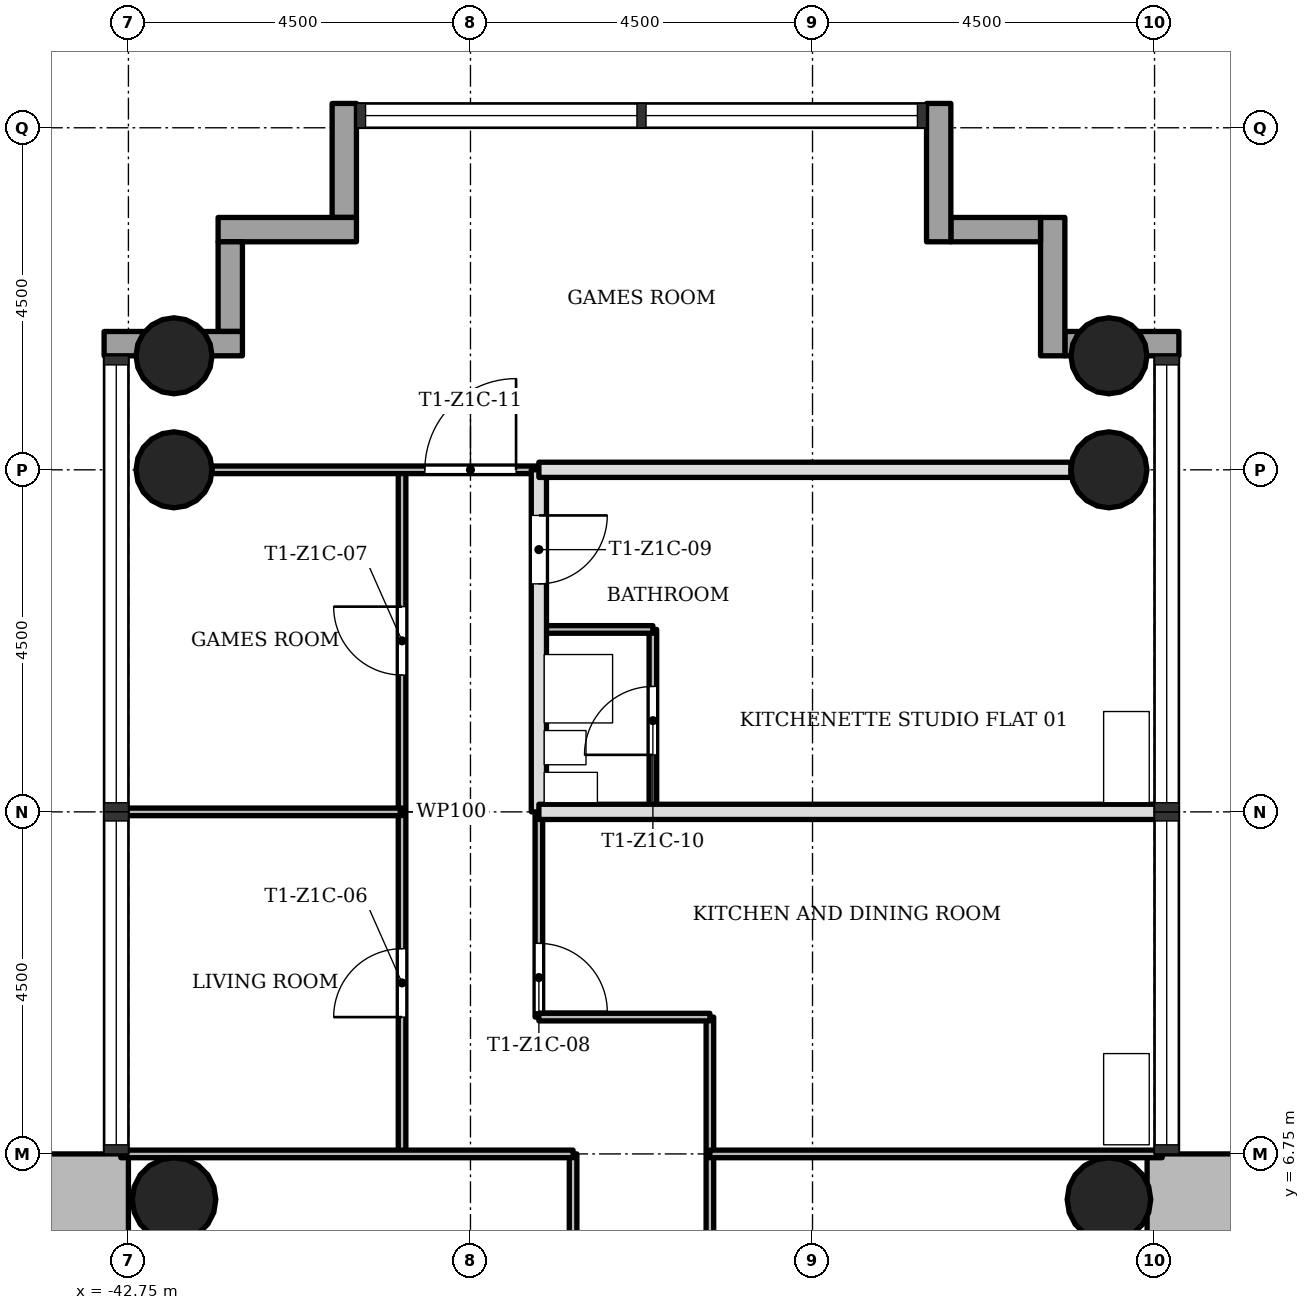
"""IFC4 building model, lengths in metres.
Left out: names, types, materials, properties, quantities, classifications, styles, units other than length and angle.
Written with IfcOpenShell. Run it as: python <this file> out.ifc"""

import sys

from ifc_helpers import new_model, si_unit, direction, frame, frame_2d, origin, origin_2d, place, context, subcontext, project, spatial, rectangle, hollow_circle, extrude, element, fill, save


model = new_model("IFC4")
c1 = context("Model", 3, precision=1e-05, world=origin(), true_north=direction((0.0, 1.0)))
c2 = subcontext(c1, "Body", "Model", "MODEL_VIEW")
j1 = project(units=[si_unit("LENGTHUNIT", "METRE"), si_unit("PLANEANGLEUNIT", "RADIAN")], contexts=[c1])
p1 = place(None, origin())
s1 = spatial("IfcSite", under=j1, at=p1, CompositionType="ELEMENT")
p2 = place(p1, origin())
s2 = spatial("IfcBuilding", under=s1, at=p2, CompositionType="ELEMENT")
p3 = place(p2, frame((0.0, 0.0, 48.3)))
s3 = spatial("IfcBuildingStorey", under=s2, at=p3, CompositionType="ELEMENT", Elevation=48.3)
p4 = place(p3, frame((-21.35, 6.2, 0.0), z_axis=(0.0, 0.0, 1.0), x_axis=(-1.0, 0.0, 0.0)))
e1 = element("IfcWall", 1, at=p4, inside=s3, PredefinedType="SHEAR", context=c2, shape_type="SweptSolid", body=[
    extrude(rectangle(XDim=7.998, YDim=1.1, at=frame_2d((3.999, 0.0))), origin(), (0.0, 0.0, 1.0), 3.4),
])
p5 = place(p3, frame((-43.3, -5.65, 0.0), z_axis=(0.0, 0.0, 1.0), x_axis=(0.0, 1.0, 0.0)))
e2 = element("IfcWall", 2, at=p5, inside=s3, PredefinedType="SHEAR", context=c2, shape_type="SweptSolid", body=[
    extrude(rectangle(XDim=12.4, YDim=1.1, at=frame_2d((6.2, 0.0))), origin(), (0.0, 0.0, 1.0), 3.4),
])
p6 = place(p5, frame((4.75, 0.0, 0.0)))
e3 = element("IfcOpeningElement", 3, at=p6, cuts=e2, PredefinedType="OPENING", context=c2, shape_type="SweptSolid", body=[
    extrude(rectangle(XDim=1.8, YDim=2.1, at=frame_2d((0.9, 1.05))), frame((0.0, 0.56, 0.0), z_axis=(0.0, -1.0, 0.0), x_axis=(1.0, 0.0, 0.0)), (0.0, 0.0, 1.0), 1.12),
])
for number, where, z_axis, x_axis in (
    (4, (-29.85, 15.75, 0.0), (0.0, 0.0, 1.0), (1.0, 0.0, 0.0)),
    (5, (-42.15, 15.75, 0.0), (0.0, 0.0, 1.0), (1.0, 0.0, 0.0)),
    (6, (-29.85, 17.25, 0.0), (0.0, 0.0, 1.0), (1.0, 0.0, 0.0)),
    (7, (-42.15, 17.25, 0.0), (0.0, 0.0, 1.0), (1.0, 0.0, 0.0)),
):
    element("IfcColumn", number, at=place(p3, frame(where, z_axis=z_axis, x_axis=x_axis)), inside=s3, PredefinedType="COLUMN", context=c2, shape_type="SweptSolid", body=[
        extrude(hollow_circle(Radius=0.5, WallThickness=0.036, at=origin_2d()), origin(), (0.0, 0.0, 1.0), 3.4),
    ])
for number, where, z_axis, x_axis in (
    (8, (-29.85, 6.15, 0.0), (0.0, 0.0, 1.0), (1.0, 0.0, 0.0)),
    (9, (-42.15, 6.15, 0.0), (0.0, 0.0, 1.0), (1.0, 0.0, 0.0)),
):
    element("IfcColumn", number, at=place(p3, frame(where, z_axis=z_axis, x_axis=x_axis)), inside=s3, PredefinedType="COLUMN", context=c2, shape_type="SweptSolid", body=[
        extrude(hollow_circle(Radius=0.55, WallThickness=0.04, at=origin_2d()), origin(), (0.0, 0.0, 1.0), 3.4),
    ])
p7 = place(p3, frame((-28.93, 17.41, -0.3), z_axis=(0.0, 0.0, 1.0), x_axis=(-1.0, 0.0, 0.0)))
e10 = element("IfcWall", 10, at=p7, inside=s3, PredefinedType="STANDARD", context=c2, shape_type="SweptSolid", body=[
    extrude(rectangle(XDim=1.5, YDim=0.32, at=frame_2d((0.75, 0.0))), origin(), (0.0, 0.0, 1.0), 3.4),
])
p8 = place(p3, frame((-30.59, 17.25, -0.3), z_axis=(0.0, 0.0, 1.0), x_axis=(0.0, 1.0, 0.0)))
e11 = element("IfcWall", 11, at=p8, inside=s3, PredefinedType="STANDARD", context=c2, shape_type="SweptSolid", body=[
    extrude(rectangle(XDim=1.82, YDim=0.32, at=frame_2d((0.91, 0.0))), origin(), (0.0, 0.0, 1.0), 3.4),
])
p9 = place(p3, frame((-30.75, 18.91, -0.3), z_axis=(0.0, 0.0, 1.0), x_axis=(-1.0, 0.0, 0.0)))
e12 = element("IfcWall", 12, at=p9, inside=s3, PredefinedType="STANDARD", context=c2, shape_type="SweptSolid", body=[
    extrude(rectangle(XDim=1.18, YDim=0.32, at=frame_2d((0.59, 0.0))), origin(), (0.0, 0.0, 1.0), 3.4),
])
p10 = place(p3, frame((-32.09, 18.75, -0.3), z_axis=(0.0, 0.0, 1.0), x_axis=(0.0, 1.0, 0.0)))
e13 = element("IfcWall", 13, at=p10, inside=s3, PredefinedType="STANDARD", context=c2, shape_type="SweptSolid", body=[
    extrude(rectangle(XDim=1.82, YDim=0.32, at=frame_2d((0.91, 0.0))), origin(), (0.0, 0.0, 1.0), 3.4),
])
p11 = place(p3, frame((-39.91, 20.57, -0.3), z_axis=(0.0, 0.0, 1.0), x_axis=(0.0, -1.0, 0.0)))
e14 = element("IfcWall", 14, at=p11, inside=s3, PredefinedType="STANDARD", context=c2, shape_type="SweptSolid", body=[
    extrude(rectangle(XDim=1.5, YDim=0.32, at=frame_2d((0.75, 0.0))), origin(), (0.0, 0.0, 1.0), 3.4),
])
p12 = place(p3, frame((-39.75, 18.91, -0.3), z_axis=(0.0, 0.0, 1.0), x_axis=(-1.0, 0.0, 0.0)))
e15 = element("IfcWall", 15, at=p12, inside=s3, PredefinedType="STANDARD", context=c2, shape_type="SweptSolid", body=[
    extrude(rectangle(XDim=1.82, YDim=0.32, at=frame_2d((0.91, 0.0))), origin(), (0.0, 0.0, 1.0), 3.4),
])
p13 = place(p3, frame((-41.41, 18.75, -0.3), z_axis=(0.0, 0.0, 1.0), x_axis=(0.0, -1.0, 0.0)))
e16 = element("IfcWall", 16, at=p13, inside=s3, PredefinedType="STANDARD", context=c2, shape_type="SweptSolid", body=[
    extrude(rectangle(XDim=1.18, YDim=0.32, at=frame_2d((0.59, 0.0))), origin(), (0.0, 0.0, 1.0), 3.4),
])
p14 = place(p3, frame((-41.25, 17.41, -0.3), z_axis=(0.0, 0.0, 1.0), x_axis=(-1.0, 0.0, 0.0)))
e17 = element("IfcWall", 17, at=p14, inside=s3, PredefinedType="STANDARD", context=c2, shape_type="SweptSolid", body=[
    extrude(rectangle(XDim=1.82, YDim=0.32, at=frame_2d((0.91, 0.0))), origin(), (0.0, 0.0, 1.0), 3.4),
])
p15 = place(p3, frame((-39.15, 6.75, 0.0), z_axis=(0.0, 0.0, 1.0), x_axis=(0.0, 1.0, 0.0)))
e18 = element("IfcWall", 18, at=p15, inside=s3, PredefinedType="PARTITIONING", context=c2, shape_type="SweptSolid", body=[
    extrude(rectangle(XDim=9.0, YDim=0.1, at=frame_2d((4.5, 0.0))), origin(), (0.0, 0.0, 1.0), 3.0),
])
p16 = place(p15, frame((1.8, 0.0, 0.0)))
e19 = element("IfcOpeningElement", 19, at=p16, cuts=e18, PredefinedType="OPENING", context=c2, shape_type="SweptSolid", body=[
    extrude(rectangle(XDim=0.9, YDim=2.1, at=frame_2d((0.45, 1.05))), frame((0.0, 0.06, 0.0), z_axis=(0.0, -1.0, 0.0), x_axis=(1.0, 0.0, 0.0)), (0.0, 0.0, 1.0), 0.12),
])
p17 = place(p15, frame((6.3, 0.0, 0.0)))
e20 = element("IfcOpeningElement", 20, at=p17, cuts=e18, PredefinedType="OPENING", context=c2, shape_type="SweptSolid", body=[
    extrude(rectangle(XDim=0.9, YDim=2.1, at=frame_2d((0.45, 1.05))), frame((0.0, 0.06, 0.0), z_axis=(0.0, -1.0, 0.0), x_axis=(1.0, 0.0, 0.0)), (0.0, 0.0, 1.0), 0.12),
])
p18 = place(p3, frame((-37.35, 8.55, 0.0), z_axis=(0.0, 0.0, 1.0), x_axis=(0.0, 1.0, 0.0)))
e21 = element("IfcWall", 21, at=p18, inside=s3, PredefinedType="PARTITIONING", context=c2, shape_type="SweptSolid", body=[
    extrude(rectangle(XDim=2.7, YDim=0.1, at=frame_2d((1.35, 0.0))), origin(), (0.0, 0.0, 1.0), 3.0),
])
p19 = place(p18, frame((0.07, 0.0, 0.0)))
e22 = element("IfcOpeningElement", 22, at=p19, cuts=e21, PredefinedType="OPENING", context=c2, shape_type="SweptSolid", body=[
    extrude(rectangle(XDim=0.9, YDim=2.1, at=frame_2d((0.45, 1.05))), frame((0.0, 0.06, 0.0), z_axis=(0.0, -1.0, 0.0), x_axis=(1.0, 0.0, 0.0)), (0.0, 0.0, 1.0), 0.12),
])
p20 = place(p3, frame((-37.35, 11.25, 0.0), z_axis=(0.0, 0.0, 1.0), x_axis=(0.0, 1.0, 0.0)))
e23 = element("IfcWall", 23, at=p20, inside=s3, PredefinedType="SOLIDWALL", context=c2, shape_type="SweptSolid", body=[
    extrude(rectangle(XDim=4.5, YDim=0.2, at=frame_2d((2.25, 0.0))), origin(), (0.0, 0.0, 1.0), 3.0),
])
p21 = place(p20, frame((3.0, 0.0, 0.0)))
e24 = element("IfcOpeningElement", 24, at=p21, cuts=e23, PredefinedType="OPENING", context=c2, shape_type="SweptSolid", body=[
    extrude(rectangle(XDim=0.9, YDim=2.1, at=frame_2d((0.45, 1.05))), frame((0.0, 0.11, 0.0), z_axis=(0.0, -1.0, 0.0), x_axis=(1.0, 0.0, 0.0)), (0.0, 0.0, 1.0), 0.22),
])
p22 = place(p3, frame((-36.9, 1.5, 0.0), z_axis=(0.0, 0.0, 1.0), x_axis=(0.0, 1.0, 0.0)))
e25 = element("IfcWall", 25, at=p22, inside=s3, PredefinedType="PARTITIONING", context=c2, shape_type="SweptSolid", body=[
    extrude(rectangle(XDim=5.25, YDim=0.1, at=frame_2d((2.625, 0.0))), origin(), (0.0, 0.0, 1.0), 3.0),
])
p23 = place(p3, frame((-35.85, 11.25, 0.0), z_axis=(0.0, 0.0, 1.0), x_axis=(0.0, 1.0, 0.0)))
e26 = element("IfcWall", 26, at=p23, inside=s3, PredefinedType="PARTITIONING", context=c2, shape_type="SweptSolid", body=[
    extrude(rectangle(XDim=2.4, YDim=0.1, at=frame_2d((1.2, 0.0))), origin(), (0.0, 0.0, 1.0), 3.0),
])
p24 = place(p23, frame((0.75, 0.0, 0.0)))
e27 = element("IfcOpeningElement", 27, at=p24, cuts=e26, PredefinedType="OPENING", context=c2, shape_type="SweptSolid", body=[
    extrude(rectangle(XDim=0.9, YDim=2.1, at=frame_2d((0.45, 1.05))), frame((0.0, 0.06, 0.0), z_axis=(0.0, -1.0, 0.0), x_axis=(1.0, 0.0, 0.0)), (0.0, 0.0, 1.0), 0.12),
])
p25 = place(p3, frame((-35.1, 1.5, 0.0), z_axis=(0.0, 0.0, 1.0), x_axis=(0.0, 1.0, 0.0)))
e28 = element("IfcWall", 28, at=p25, inside=s3, PredefinedType="PARTITIONING", context=c2, shape_type="SweptSolid", body=[
    extrude(rectangle(XDim=7.05, YDim=0.1, at=frame_2d((3.525, 0.0))), origin(), (0.0, 0.0, 1.0), 3.0),
])
p26 = place(p25, frame((0.75, 0.0, 0.0)))
e29 = element("IfcOpeningElement", 29, at=p26, cuts=e28, PredefinedType="OPENING", context=c2, shape_type="SweptSolid", body=[
    extrude(rectangle(XDim=0.9, YDim=2.1, at=frame_2d((0.45, 1.05))), frame((0.0, 0.06, 0.0), z_axis=(0.0, -1.0, 0.0), x_axis=(1.0, 0.0, 0.0)), (0.0, 0.0, 1.0), 0.12),
])
for number, where, z_axis, x_axis in (
    (30, (-42.85, 6.75, 0.0), (0.0, 0.0, 1.0), (1.0, 0.0, 0.0)),
    (31, (-35.1, 6.75, 0.0), (0.0, 0.0, 1.0), (1.0, 0.0, 0.0)),
):
    element("IfcWall", number, at=place(p3, frame(where, z_axis=z_axis, x_axis=x_axis)), inside=s3, PredefinedType="PARTITIONING", context=c2, shape_type="SweptSolid", body=[
        extrude(rectangle(XDim=5.95, YDim=0.1, at=frame_2d((2.975, 0.0))), origin(), (0.0, 0.0, 1.0), 3.0),
    ])
p27 = place(p3, frame((-37.35, 8.55, 0.0), z_axis=(0.0, 0.0, 1.0), x_axis=(1.0, 0.0, 0.0)))
e32 = element("IfcWall", 32, at=p27, inside=s3, PredefinedType="PARTITIONING", context=c2, shape_type="SweptSolid", body=[
    extrude(rectangle(XDim=2.25, YDim=0.1, at=frame_2d((1.125, 0.0))), origin(), (0.0, 0.0, 1.0), 3.0),
])
p28 = place(p3, frame((-42.85, 11.25, 0.0), z_axis=(0.0, 0.0, 1.0), x_axis=(1.0, 0.0, 0.0)))
e33 = element("IfcWall", 33, at=p28, inside=s3, PredefinedType="PARTITIONING", context=c2, shape_type="SweptSolid", body=[
    extrude(rectangle(XDim=3.7, YDim=0.1, at=frame_2d((1.85, 0.0))), origin(), (0.0, 0.0, 1.0), 3.0),
])
p29 = place(p3, frame((-37.35, 11.25, 0.0), z_axis=(0.0, 0.0, 1.0), x_axis=(1.0, 0.0, 0.0)))
e34 = element("IfcWall", 34, at=p29, inside=s3, PredefinedType="SOLIDWALL", context=c2, shape_type="SweptSolid", body=[
    extrude(rectangle(XDim=8.2, YDim=0.2, at=frame_2d((4.1, 0.0))), origin(), (0.0, 0.0, 1.0), 3.0),
])
p30 = place(p3, frame((-37.35, 13.65, 0.0), z_axis=(0.0, 0.0, 1.0), x_axis=(1.0, 0.0, 0.0)))
e35 = element("IfcWall", 35, at=p30, inside=s3, PredefinedType="PARTITIONING", context=c2, shape_type="SweptSolid", body=[
    extrude(rectangle(XDim=1.5, YDim=0.1, at=frame_2d((0.75, 0.0))), origin(), (0.0, 0.0, 1.0), 3.0),
])
p31 = place(p3, frame((-41.65, 15.75, 0.0), z_axis=(0.0, 0.0, 1.0), x_axis=(1.0, 0.0, 0.0)))
e36 = element("IfcWall", 36, at=p31, inside=s3, PredefinedType="PARTITIONING", context=c2, shape_type="SweptSolid", body=[
    extrude(rectangle(XDim=4.3, YDim=0.1, at=frame_2d((2.15, 0.0))), origin(), (0.0, 0.0, 1.0), 3.0),
])
p32 = place(p31, frame((2.8, 0.0, 0.0)))
e37 = element("IfcOpeningElement", 37, at=p32, cuts=e36, PredefinedType="OPENING", context=c2, shape_type="SweptSolid", body=[
    extrude(rectangle(XDim=1.2, YDim=2.1, at=frame_2d((0.6, 1.05))), frame((0.0, 0.06, 0.0), z_axis=(0.0, -1.0, 0.0), x_axis=(1.0, 0.0, 0.0)), (0.0, 0.0, 1.0), 0.12),
])
p33 = place(p3, frame((-37.35, 15.75, 0.0), z_axis=(0.0, 0.0, 1.0), x_axis=(1.0, 0.0, 0.0)))
e38 = element("IfcWall", 38, at=p33, inside=s3, PredefinedType="SOLIDWALL", context=c2, shape_type="SweptSolid", body=[
    extrude(rectangle(XDim=7.0, YDim=0.2, at=frame_2d((3.5, 0.0))), origin(), (0.0, 0.0, 1.0), 3.0),
])
p34 = place(p16, origin())
e39 = element("IfcDoor", 39, at=p34, inside=s3, OperationType="SINGLE_SWING_RIGHT", PredefinedType="DOOR", context=c2, shape_type="SweptSolid", body=[
    extrude(rectangle(XDim=0.9, YDim=2.1, at=frame_2d((0.45, 1.05))), frame((0.0, 0.025, 0.0), z_axis=(0.0, -1.0, 0.0), x_axis=(1.0, 0.0, 0.0)), (0.0, 0.0, 1.0), 0.05),
])
fill(e19, e39)
p35 = place(p17, origin())
e40 = element("IfcDoor", 40, at=p35, inside=s3, OperationType="SINGLE_SWING_LEFT", PredefinedType="DOOR", context=c2, shape_type="SweptSolid", body=[
    extrude(rectangle(XDim=0.9, YDim=2.1, at=frame_2d((0.45, 1.05))), frame((0.0, 0.025, 0.0), z_axis=(0.0, -1.0, 0.0), x_axis=(1.0, 0.0, 0.0)), (0.0, 0.0, 1.0), 0.05),
])
fill(e20, e40)
p36 = place(p19, origin())
e41 = element("IfcDoor", 41, at=p36, inside=s3, OperationType="SINGLE_SWING_LEFT", PredefinedType="DOOR", context=c2, shape_type="SweptSolid", body=[
    extrude(rectangle(XDim=0.9, YDim=2.1, at=frame_2d((0.45, 1.05))), frame((0.0, 0.025, 0.0), z_axis=(0.0, -1.0, 0.0), x_axis=(1.0, 0.0, 0.0)), (0.0, 0.0, 1.0), 0.05),
])
fill(e22, e41)
p37 = place(p21, origin())
e42 = element("IfcDoor", 42, at=p37, inside=s3, OperationType="SINGLE_SWING_RIGHT", PredefinedType="DOOR", context=c2, shape_type="SweptSolid", body=[
    extrude(rectangle(XDim=0.9, YDim=2.1, at=frame_2d((0.45, 1.05))), frame((0.0, 0.025, 0.0), z_axis=(0.0, -1.0, 0.0), x_axis=(1.0, 0.0, 0.0)), (0.0, 0.0, 1.0), 0.05),
])
fill(e24, e42)
p38 = place(p24, origin())
e43 = element("IfcDoor", 43, at=p38, inside=s3, OperationType="SINGLE_SWING_RIGHT", PredefinedType="DOOR", context=c2, shape_type="SweptSolid", body=[
    extrude(rectangle(XDim=0.9, YDim=2.1, at=frame_2d((0.45, 1.05))), frame((0.0, 0.025, 0.0), z_axis=(0.0, -1.0, 0.0), x_axis=(1.0, 0.0, 0.0)), (0.0, 0.0, 1.0), 0.05),
])
fill(e27, e43)
p39 = place(p32, origin())
e44 = element("IfcDoor", 44, at=p39, inside=s3, OperationType="SINGLE_SWING_LEFT", PredefinedType="DOOR", context=c2, shape_type="SweptSolid", body=[
    extrude(rectangle(XDim=1.2, YDim=2.1, at=frame_2d((0.6, 1.05))), frame((0.0, 0.025, 0.0), z_axis=(0.0, -1.0, 0.0), x_axis=(1.0, 0.0, 0.0)), (0.0, 0.0, 1.0), 0.05),
])
fill(e37, e44)
save(model, sys.argv[1])
